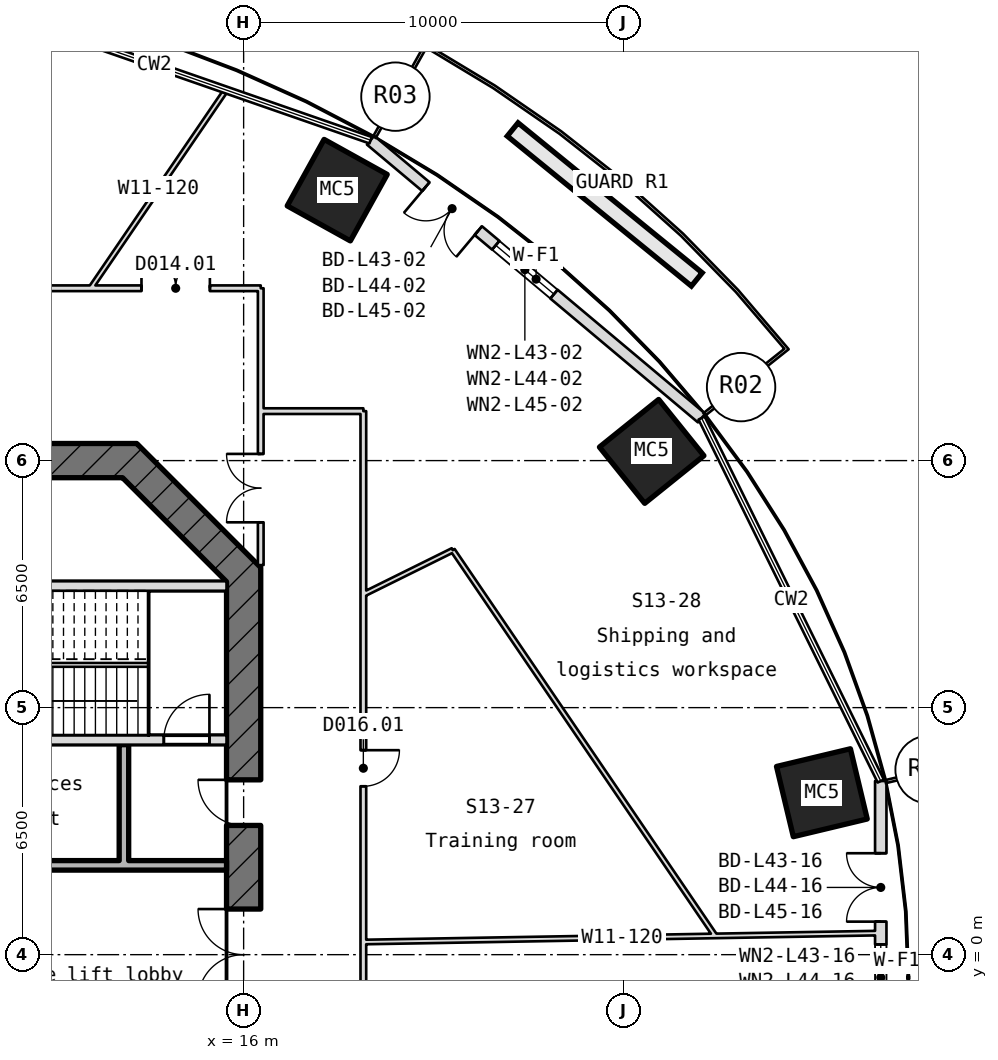
"""IFC4 building model, lengths in metres.
Left out: names, types, materials, properties, quantities, classifications, styles, units other than length and angle.
Written with IfcOpenShell. Run it as: python <this file> out.ifc"""

import sys

from ifc_helpers import new_model, si_unit, direction, frame, frame_2d, origin, origin_2d, place, context, subcontext, project, spatial, rectangle, hollow_rectangle, extrude, element, fill, save


model = new_model("IFC4")
c1 = context("Model", 3, precision=1e-05, world=origin(), true_north=direction((0.0, 1.0)))
c2 = subcontext(c1, "Body", "Model", "MODEL_VIEW")
j1 = project(units=[si_unit("LENGTHUNIT", "METRE"), si_unit("PLANEANGLEUNIT", "RADIAN")], contexts=[c1])
p1 = place(None, origin())
s1 = spatial("IfcSite", under=j1, at=p1, CompositionType="ELEMENT")
p2 = place(p1, origin())
s2 = spatial("IfcBuilding", under=s1, at=p2, CompositionType="ELEMENT")
p3 = place(p2, frame((0.0, 0.0, 198.4)))
s3 = spatial("IfcBuildingStorey", under=s2, at=p3, CompositionType="ELEMENT", Elevation=198.4)
for number, where, z_axis, x_axis in (
    (1, (31.216, 4.261, -0.18), (0.0, 0.0, 1.0), (0.233, -0.973, 0.0)),
    (2, (26.737, 13.242, -0.18), (0.0, 0.0, 1.0), (0.627, -0.779, 0.0)),
    (3, (18.463, 20.116, -0.18), (0.0, 0.0, 1.0), (0.874, -0.485, 0.0)),
):
    element("IfcColumn", number, at=place(p3, frame(where, z_axis=z_axis, x_axis=x_axis)), inside=s3, PredefinedType="COLUMN", context=c2, shape_type="SweptSolid", body=[
        extrude(hollow_rectangle(XDim=1.9, YDim=2.0, WallThickness=0.07, at=origin_2d()), origin(), (0.0, 0.0, 1.0), 4.15),
    ])
p4 = place(p3, frame((28.051, 14.12, 0.0), z_axis=(0.0, 0.0, 1.0), x_axis=(-0.766004647457, 0.642835033329, 0.0)))
e4 = element("IfcWall", 4, at=p4, inside=s3, PredefinedType="SOLIDWALL", context=c2, shape_type="SweptSolid", body=[
    extrude(rectangle(XDim=11.372, YDim=0.3, at=frame_2d((5.686, 0.0))), origin(), (0.0, 0.0, 1.0), 3.97),
])
p5 = place(p4, frame((7.672, 0.0, 0.0)))
e5 = element("IfcOpeningElement", 5, at=p5, cuts=e4, PredefinedType="OPENING", context=c2, shape_type="SweptSolid", body=[
    extrude(rectangle(XDim=1.8, YDim=2.4, at=frame_2d((0.9, 1.2))), frame((0.0, 0.16, 0.0), z_axis=(0.0, -1.0, 0.0), x_axis=(1.0, 0.0, 0.0)), (0.0, 0.0, 1.0), 0.32),
])
p6 = place(p4, frame((5.072, 0.0, 0.9)))
e6 = element("IfcOpeningElement", 6, at=p6, cuts=e4, PredefinedType="OPENING", context=c2, shape_type="SweptSolid", body=[
    extrude(rectangle(XDim=2.0, YDim=1.5, at=frame_2d((1.0, 0.75))), frame((0.0, 0.16, 0.0), z_axis=(0.0, -1.0, 0.0), x_axis=(1.0, 0.0, 0.0)), (0.0, 0.0, 1.0), 0.32),
])
p7 = place(p3, frame((32.765, -5.769, 0.0), z_axis=(0.0, 0.0, 1.0), x_axis=(0.0, 1.0, 0.0)))
e7 = element("IfcWall", 7, at=p7, inside=s3, PredefinedType="SOLIDWALL", context=c2, shape_type="SweptSolid", body=[
    extrude(rectangle(XDim=10.338, YDim=0.3, at=frame_2d((5.169, 0.0))), origin(), (0.0, 0.0, 1.0), 3.97),
])
p8 = place(p7, frame((6.638, 0.0, 0.0)))
e8 = element("IfcOpeningElement", 8, at=p8, cuts=e7, PredefinedType="OPENING", context=c2, shape_type="SweptSolid", body=[
    extrude(rectangle(XDim=1.8, YDim=2.4, at=frame_2d((0.9, 1.2))), frame((0.0, 0.16, 0.0), z_axis=(0.0, -1.0, 0.0), x_axis=(1.0, 0.0, 0.0)), (0.0, 0.0, 1.0), 0.32),
])
p9 = place(p7, frame((4.038, 0.0, 0.9)))
e9 = element("IfcOpeningElement", 9, at=p9, cuts=e7, PredefinedType="OPENING", context=c2, shape_type="SweptSolid", body=[
    extrude(rectangle(XDim=2.0, YDim=1.5, at=frame_2d((1.0, 0.75))), frame((0.0, 0.16, 0.0), z_axis=(0.0, -1.0, 0.0), x_axis=(1.0, 0.0, 0.0)), (0.0, 0.0, 1.0), 0.32),
])
p10 = place(p3, frame((16.0, -10.186, -0.18), z_axis=(0.0, 0.0, 1.0), x_axis=(0.0, 1.0, 0.0)))
e10 = element("IfcWall", 10, at=p10, inside=s3, PredefinedType="SHEAR", context=c2, shape_type="SweptSolid", body=[
    extrude(rectangle(XDim=20.373, YDim=0.9, at=frame_2d((10.186, 0.0))), origin(), (0.0, 0.0, 1.0), 4.15),
])
p11 = place(p10, frame((8.986, 0.0, 0.18)))
e11 = element("IfcOpeningElement", 11, at=p11, cuts=e10, PredefinedType="OPENING", context=c2, shape_type="SweptSolid", body=[
    extrude(rectangle(XDim=2.4, YDim=2.1, at=frame_2d((1.2, 1.05))), frame((0.0, 0.46, 0.0), z_axis=(0.0, -1.0, 0.0), x_axis=(1.0, 0.0, 0.0)), (0.0, 0.0, 1.0), 0.92),
])
p12 = place(p10, frame((13.586, 0.0, 0.18)))
e12 = element("IfcOpeningElement", 12, at=p12, cuts=e10, PredefinedType="OPENING", context=c2, shape_type="SweptSolid", body=[
    extrude(rectangle(XDim=1.2, YDim=2.1, at=frame_2d((0.6, 1.05))), frame((0.0, 0.46, 0.0), z_axis=(0.0, -1.0, 0.0), x_axis=(1.0, 0.0, 0.0)), (0.0, 0.0, 1.0), 0.92),
])
p13 = place(p10, frame((3.586, 0.0, 0.18)))
e13 = element("IfcOpeningElement", 13, at=p13, cuts=e10, PredefinedType="OPENING", context=c2, shape_type="SweptSolid", body=[
    extrude(rectangle(XDim=1.2, YDim=2.1, at=frame_2d((0.6, 1.05))), frame((0.0, 0.46, 0.0), z_axis=(0.0, -1.0, 0.0), x_axis=(1.0, 0.0, 0.0)), (0.0, 0.0, 1.0), 0.92),
])
p14 = place(p3, frame((16.132, 9.868, -0.18), z_axis=(0.0, 0.0, 1.0), x_axis=(-0.707106781187, 0.707106781187, 0.0)))
e14 = element("IfcWall", 14, at=p14, inside=s3, PredefinedType="SHEAR", context=c2, shape_type="SweptSolid", body=[
    extrude(rectangle(XDim=4.615, YDim=0.9, at=frame_2d((2.308, 0.0))), origin(), (0.0, 0.0, 1.0), 4.15),
])
p15 = place(p3, frame((13.186, 13.0, -0.18), z_axis=(0.0, 0.0, 1.0), x_axis=(-1.0, 0.0, 0.0)))
e15 = element("IfcWall", 15, at=p15, inside=s3, PredefinedType="SHEAR", context=c2, shape_type="SweptSolid", body=[
    extrude(rectangle(XDim=26.373, YDim=0.9, at=frame_2d((13.186, 0.0))), origin(), (0.0, 0.0, 1.0), 4.15),
])
p16 = place(p15, frame((19.094, 0.0, 0.18)))
e16 = element("IfcOpeningElement", 16, at=p16, cuts=e15, PredefinedType="OPENING", context=c2, shape_type="SweptSolid", body=[
    extrude(rectangle(XDim=1.0, YDim=2.1, at=frame_2d((0.5, 1.05))), frame((0.0, 0.46, 0.0), z_axis=(0.0, -1.0, 0.0), x_axis=(1.0, 0.0, 0.0)), (0.0, 0.0, 1.0), 0.92),
])
p17 = place(p15, frame((6.279, 0.0, 0.18)))
e17 = element("IfcOpeningElement", 17, at=p17, cuts=e15, PredefinedType="OPENING", context=c2, shape_type="SweptSolid", body=[
    extrude(rectangle(XDim=1.0, YDim=2.1, at=frame_2d((0.5, 1.05))), frame((0.0, 0.46, 0.0), z_axis=(0.0, -1.0, 0.0), x_axis=(1.0, 0.0, 0.0)), (0.0, 0.0, 1.0), 0.92),
])
p18 = place(p3, frame((8.4, 2.35, 0.0), z_axis=(0.0, 0.0, 1.0), x_axis=(1.0, 0.0, 0.0)))
e18 = element("IfcWall", 18, at=p18, inside=s3, PredefinedType="STANDARD", context=c2, shape_type="SweptSolid", body=[
    extrude(rectangle(XDim=7.15, YDim=0.25, at=frame_2d((3.575, 0.0))), origin(), (0.0, 0.0, 1.0), 3.97),
])
p19 = place(p3, frame((8.55, 5.65, -0.18), z_axis=(0.0, 0.0, 1.0), x_axis=(1.0, 0.0, 0.0)))
e19 = element("IfcWall", 19, at=p19, inside=s3, PredefinedType="SHEAR", context=c2, shape_type="SweptSolid", body=[
    extrude(rectangle(XDim=7.0, YDim=0.25, at=frame_2d((3.5, 0.0))), origin(), (0.0, 0.0, 1.0), 4.15),
])
p20 = place(p19, frame((5.35, 0.0, 0.18)))
e20 = element("IfcOpeningElement", 20, at=p20, cuts=e19, PredefinedType="OPENING", context=c2, shape_type="SweptSolid", body=[
    extrude(rectangle(XDim=1.2, YDim=2.1, at=frame_2d((0.6, 1.05))), frame((0.0, 0.135, 0.0), z_axis=(0.0, -1.0, 0.0), x_axis=(1.0, 0.0, 0.0)), (0.0, 0.0, 1.0), 0.27),
])
p21 = place(p3, frame((8.55, 9.7, -0.18), z_axis=(0.0, 0.0, 1.0), x_axis=(1.0, 0.0, 0.0)))
e21 = element("IfcWall", 21, at=p21, inside=s3, PredefinedType="SHEAR", context=c2, shape_type="SweptSolid", body=[
    extrude(rectangle(XDim=7.0, YDim=0.25, at=frame_2d((3.5, 0.0))), origin(), (0.0, 0.0, 1.0), 4.15),
])
p22 = place(p3, frame((12.85, 2.475, 0.0), z_axis=(0.0, 0.0, 1.0), x_axis=(0.0, 1.0, 0.0)))
e22 = element("IfcWall", 22, at=p22, inside=s3, PredefinedType="STANDARD", context=c2, shape_type="SweptSolid", body=[
    extrude(rectangle(XDim=3.05, YDim=0.25, at=frame_2d((1.525, 0.0))), origin(), (0.0, 0.0, 1.0), 3.97),
])
p23 = place(p3, frame((-16.45, 17.534, 0.0), z_axis=(0.0, 0.0, 1.0), x_axis=(1.0, 0.0, 0.0)))
e23 = element("IfcWall", 23, at=p23, inside=s3, PredefinedType="PARTITIONING", context=c2, shape_type="SweptSolid", body=[
    extrude(rectangle(XDim=32.9, YDim=0.15, at=frame_2d((16.45, 0.0))), origin(), (0.0, 0.0, 1.0), 3.97),
])
p24 = place(p23, frame((29.762, 0.0, 0.0)))
e24 = element("IfcOpeningElement", 24, at=p24, cuts=e23, PredefinedType="OPENING", context=c2, shape_type="SweptSolid", body=[
    extrude(rectangle(XDim=1.8, YDim=2.1, at=frame_2d((0.9, 1.05))), frame((0.0, 0.085, 0.0), z_axis=(0.0, -1.0, 0.0), x_axis=(1.0, 0.0, 0.0)), (0.0, 0.0, 1.0), 0.17),
])
p25 = place(p23, frame((13.312, 0.0, 0.0)))
e25 = element("IfcOpeningElement", 25, at=p25, cuts=e23, PredefinedType="OPENING", context=c2, shape_type="SweptSolid", body=[
    extrude(rectangle(XDim=1.8, YDim=2.1, at=frame_2d((0.9, 1.05))), frame((0.0, 0.085, 0.0), z_axis=(0.0, -1.0, 0.0), x_axis=(1.0, 0.0, 0.0)), (0.0, 0.0, 1.0), 0.17),
])
p26 = place(p3, frame((11.974, 17.534, 0.0), z_axis=(0.0, 0.0, 1.0), x_axis=(0.563957789677, 0.825803615554, 0.0)))
e26 = element("IfcWall", 26, at=p26, inside=s3, PredefinedType="PARTITIONING", context=c2, shape_type="SweptSolid", body=[
    extrude(rectangle(XDim=6.318, YDim=0.12, at=frame_2d((3.159, 0.0))), origin(), (0.0, 0.0, 1.0), 3.97),
])
p27 = place(p3, frame((16.45, 10.25, 0.0), z_axis=(0.0, 0.0, 1.0), x_axis=(0.0, 1.0, 0.0)))
e27 = element("IfcWall", 27, at=p27, inside=s3, PredefinedType="PARTITIONING", context=c2, shape_type="SweptSolid", body=[
    extrude(rectangle(XDim=7.284, YDim=0.15, at=frame_2d((3.642, 0.0))), origin(), (0.0, 0.0, 1.0), 3.97),
])
p28 = place(p27, frame((1.126, 0.0, 0.0)))
e28 = element("IfcOpeningElement", 28, at=p28, cuts=e27, PredefinedType="OPENING", context=c2, shape_type="SweptSolid", body=[
    extrude(rectangle(XDim=1.8, YDim=2.1, at=frame_2d((0.9, 1.05))), frame((0.0, 0.085, 0.0), z_axis=(0.0, -1.0, 0.0), x_axis=(1.0, 0.0, 0.0)), (0.0, 0.0, 1.0), 0.17),
])
p29 = place(p3, frame((16.45, 14.301, 0.0), z_axis=(0.0, 0.0, 1.0), x_axis=(1.0, 0.0, 0.0)))
e29 = element("IfcWall", 29, at=p29, inside=s3, PredefinedType="PARTITIONING", context=c2, shape_type="SweptSolid", body=[
    extrude(rectangle(XDim=2.7, YDim=0.15, at=frame_2d((1.35, 0.0))), origin(), (0.0, 0.0, 1.0), 3.97),
])
p30 = place(p3, frame((19.15, 0.333, 0.0), z_axis=(0.0, 0.0, 1.0), x_axis=(0.999849395868, 0.01735469912, 0.0)))
e30 = element("IfcWall", 30, at=p30, inside=s3, PredefinedType="PARTITIONING", context=c2, shape_type="SweptSolid", body=[
    extrude(rectangle(XDim=13.617, YDim=0.12, at=frame_2d((6.809, 0.0))), origin(), (0.0, 0.0, 1.0), 3.97),
])
p31 = place(p3, frame((19.15, 14.301, 0.0), z_axis=(0.0, 0.0, 1.0), x_axis=(0.0, -1.0, 0.0)))
e31 = element("IfcWall", 31, at=p31, inside=s3, PredefinedType="PARTITIONING", context=c2, shape_type="SweptSolid", body=[
    extrude(rectangle(XDim=30.151, YDim=0.15, at=frame_2d((15.076, 0.0))), origin(), (0.0, 0.0, 1.0), 3.97),
])
p32 = place(p31, frame((8.921, 0.0, 0.0)))
e32 = element("IfcOpeningElement", 32, at=p32, cuts=e31, PredefinedType="OPENING", context=c2, shape_type="SweptSolid", body=[
    extrude(rectangle(XDim=0.95, YDim=2.1, at=frame_2d((0.475, 1.05))), frame((0.0, 0.085, 0.0), z_axis=(0.0, -1.0, 0.0), x_axis=(1.0, 0.0, 0.0)), (0.0, 0.0, 1.0), 0.17),
])
p33 = place(p31, frame((18.26, 0.0, 0.0)))
e33 = element("IfcOpeningElement", 33, at=p33, cuts=e31, PredefinedType="OPENING", context=c2, shape_type="SweptSolid", body=[
    extrude(rectangle(XDim=1.8, YDim=2.1, at=frame_2d((0.9, 1.05))), frame((0.0, 0.085, 0.0), z_axis=(0.0, -1.0, 0.0), x_axis=(1.0, 0.0, 0.0)), (0.0, 0.0, 1.0), 0.17),
])
p34 = place(p3, frame((21.503, 10.641, 0.0), z_axis=(0.0, 0.0, 1.0), x_axis=(-0.896298018084, -0.443452210254, 0.0)))
e34 = element("IfcWall", 34, at=p34, inside=s3, PredefinedType="PARTITIONING", context=c2, shape_type="SweptSolid", body=[
    extrude(rectangle(XDim=2.625, YDim=0.12, at=frame_2d((1.312, 0.0))), origin(), (0.0, 0.0, 1.0), 3.426),
])
p35 = place(p3, frame((28.408, 0.493, 0.0), z_axis=(0.0, 0.0, 1.0), x_axis=(-0.562606484452, 0.826724829464, 0.0)))
e35 = element("IfcWall", 35, at=p35, inside=s3, PredefinedType="PARTITIONING", context=c2, shape_type="SweptSolid", body=[
    extrude(rectangle(XDim=12.275, YDim=0.12, at=frame_2d((6.137, 0.0))), origin(), (0.0, 0.0, 1.0), 3.97),
])
p36 = place(p5, origin())
e36 = element("IfcDoor", 36, at=p36, inside=s3, OperationType="SINGLE_SWING_LEFT", PredefinedType="DOOR", context=c2, shape_type="SweptSolid", body=[
    extrude(rectangle(XDim=1.8, YDim=2.4, at=frame_2d((0.9, 1.2))), frame((0.0, 0.025, 0.0), z_axis=(0.0, -1.0, 0.0), x_axis=(1.0, 0.0, 0.0)), (0.0, 0.0, 1.0), 0.05),
])
fill(e5, e36)
p37 = place(p6, origin())
e37 = element("IfcWindow", 37, at=p37, inside=s3, PartitioningType="SINGLE_PANEL", PredefinedType="WINDOW", context=c2, shape_type="SweptSolid", body=[
    extrude(rectangle(XDim=2.0, YDim=1.5, at=frame_2d((1.0, 0.75))), frame((0.0, 0.03, 0.0), z_axis=(0.0, -1.0, 0.0), x_axis=(1.0, 0.0, 0.0)), (0.0, 0.0, 1.0), 0.06),
])
fill(e6, e37)
p38 = place(p8, origin())
e38 = element("IfcDoor", 38, at=p38, inside=s3, OperationType="SINGLE_SWING_LEFT", PredefinedType="DOOR", context=c2, shape_type="SweptSolid", body=[
    extrude(rectangle(XDim=1.8, YDim=2.4, at=frame_2d((0.9, 1.2))), frame((0.0, 0.025, 0.0), z_axis=(0.0, -1.0, 0.0), x_axis=(1.0, 0.0, 0.0)), (0.0, 0.0, 1.0), 0.05),
])
fill(e8, e38)
p39 = place(p9, origin())
e39 = element("IfcWindow", 39, at=p39, inside=s3, PartitioningType="SINGLE_PANEL", PredefinedType="WINDOW", context=c2, shape_type="SweptSolid", body=[
    extrude(rectangle(XDim=2.0, YDim=1.5, at=frame_2d((1.0, 0.75))), frame((0.0, 0.03, 0.0), z_axis=(0.0, -1.0, 0.0), x_axis=(1.0, 0.0, 0.0)), (0.0, 0.0, 1.0), 0.06),
])
fill(e9, e39)
p40 = place(p20, origin())
e40 = element("IfcDoor", 40, at=p40, inside=s3, OperationType="SINGLE_SWING_RIGHT", PredefinedType="DOOR", context=c2, shape_type="SweptSolid", body=[
    extrude(rectangle(XDim=1.2, YDim=2.1, at=frame_2d((0.6, 1.05))), frame((0.0, 0.025, 0.0), z_axis=(0.0, -1.0, 0.0), x_axis=(1.0, 0.0, 0.0)), (0.0, 0.0, 1.0), 0.05),
])
fill(e20, e40)
p41 = place(p11, origin())
e41 = element("IfcDoor", 41, at=p41, inside=s3, OperationType="DOUBLE_DOOR_SINGLE_SWING", PredefinedType="DOOR", context=c2, shape_type="SweptSolid", body=[
    extrude(rectangle(XDim=2.4, YDim=2.1, at=frame_2d((1.2, 1.05))), frame((0.0, 0.025, 0.0), z_axis=(0.0, -1.0, 0.0), x_axis=(1.0, 0.0, 0.0)), (0.0, 0.0, 1.0), 0.05),
])
fill(e11, e41)
p42 = place(p12, origin())
e42 = element("IfcDoor", 42, at=p42, inside=s3, OperationType="SINGLE_SWING_RIGHT", PredefinedType="DOOR", context=c2, shape_type="SweptSolid", body=[
    extrude(rectangle(XDim=1.2, YDim=2.1, at=frame_2d((0.6, 1.05))), frame((0.0, 0.025, 0.0), z_axis=(0.0, -1.0, 0.0), x_axis=(1.0, 0.0, 0.0)), (0.0, 0.0, 1.0), 0.05),
])
fill(e12, e42)
p43 = place(p32, origin())
e43 = element("IfcDoor", 43, at=p43, inside=s3, OperationType="SINGLE_SWING_RIGHT", PredefinedType="DOOR", context=c2, shape_type="SweptSolid", body=[
    extrude(rectangle(XDim=0.95, YDim=2.1, at=frame_2d((0.475, 1.05))), frame((0.0, 0.025, 0.0), z_axis=(0.0, -1.0, 0.0), x_axis=(1.0, 0.0, 0.0)), (0.0, 0.0, 1.0), 0.05),
])
fill(e32, e43)
p44 = place(p24, origin())
e44 = element("IfcDoor", 44, at=p44, inside=s3, OperationType="DOUBLE_DOOR_SINGLE_SWING", PredefinedType="DOOR", context=c2, shape_type="SweptSolid", body=[
    extrude(rectangle(XDim=1.8, YDim=2.1, at=frame_2d((0.9, 1.05))), frame((0.0, 0.025, 0.0), z_axis=(0.0, -1.0, 0.0), x_axis=(1.0, 0.0, 0.0)), (0.0, 0.0, 1.0), 0.05),
])
fill(e24, e44)
p45 = place(p28, origin())
e45 = element("IfcDoor", 45, at=p45, inside=s3, OperationType="DOUBLE_DOOR_SINGLE_SWING", PredefinedType="DOOR", context=c2, shape_type="SweptSolid", body=[
    extrude(rectangle(XDim=1.8, YDim=2.1, at=frame_2d((0.9, 1.05))), frame((0.0, 0.025, 0.0), z_axis=(0.0, -1.0, 0.0), x_axis=(1.0, 0.0, 0.0)), (0.0, 0.0, 1.0), 0.05),
])
fill(e28, e45)
save(model, sys.argv[1])
